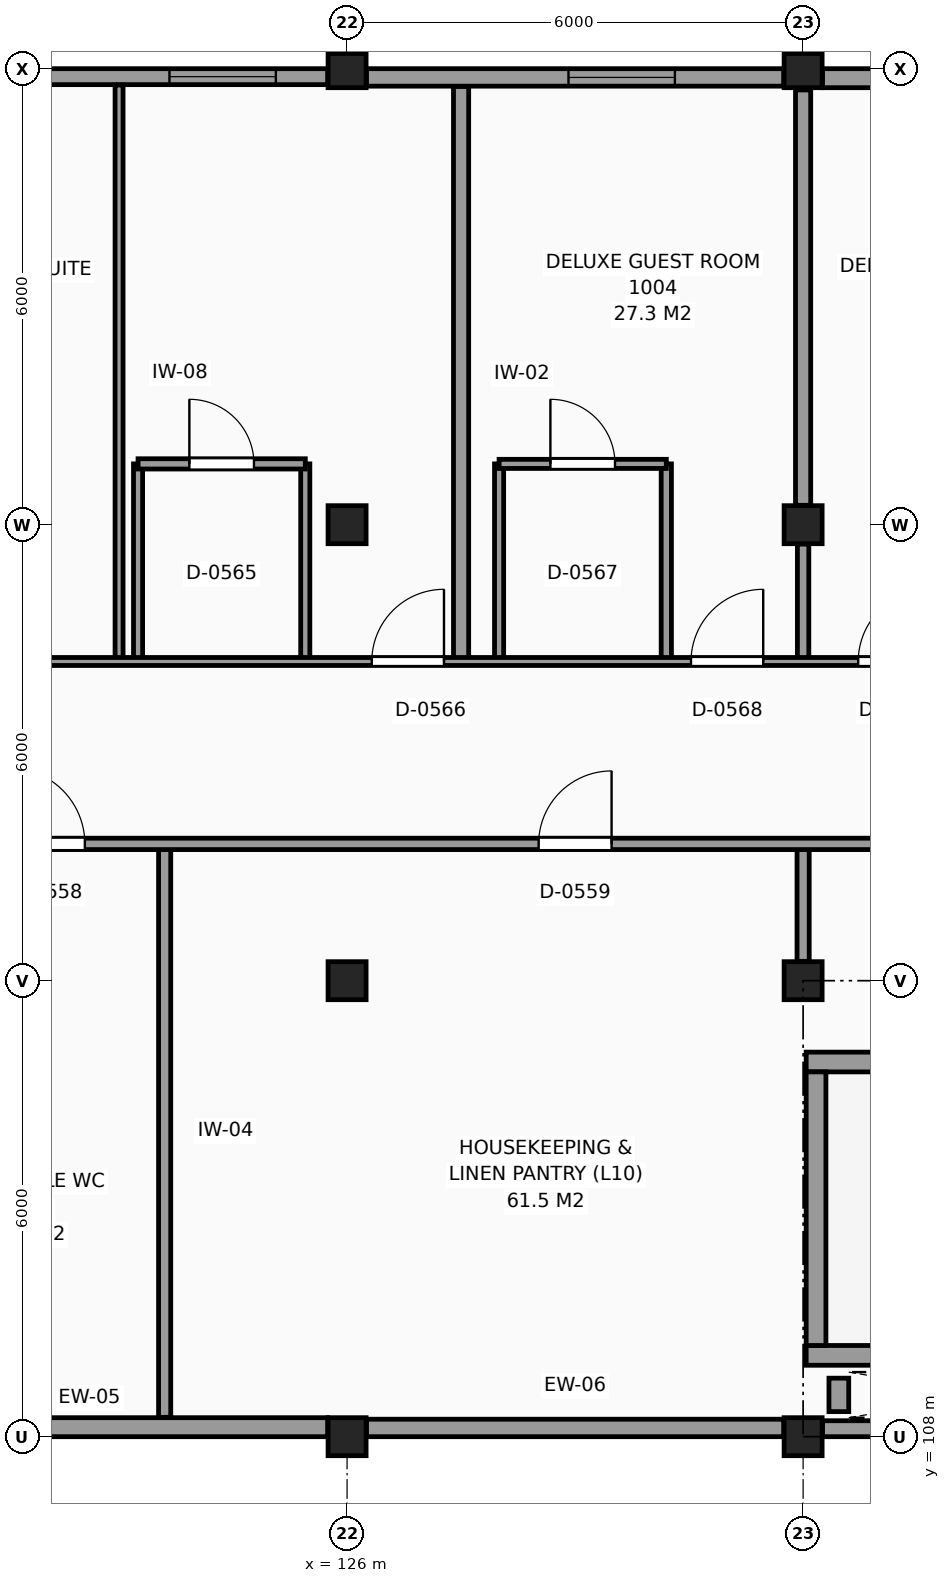
"""IFC4 building model, lengths in metres.
Left out: names, types, materials, properties, quantities, classifications, styles, units other than length and angle.
Written with IfcOpenShell. Run it as: python <this file> out.ifc"""

import sys

from ifc_helpers import new_model, si_unit, direction, frame, frame_2d, origin, origin_2d, place, context, subcontext, project, spatial, rectangle, extrude, element, fill, save


model = new_model("IFC4")
c1 = context("Model", 3, precision=1e-05, world=origin(), true_north=direction((0.0, 1.0)))
c2 = subcontext(c1, "Body", "Model", "MODEL_VIEW")
j1 = project(units=[si_unit("LENGTHUNIT", "METRE"), si_unit("PLANEANGLEUNIT", "RADIAN")], contexts=[c1])
p1 = place(None, origin())
s1 = spatial("IfcSite", under=j1, at=p1, CompositionType="ELEMENT")
p2 = place(p1, origin())
s2 = spatial("IfcBuilding", under=s1, at=p2, CompositionType="ELEMENT")
p3 = place(p2, frame((0.0, 0.0, 41.4)))
s3 = spatial("IfcBuildingStorey", under=s2, at=p3, CompositionType="ELEMENT", Elevation=41.4)
for number, where, z_axis, x_axis in (
    (1, (126.0, 108.0, 0.0), (0.0, 0.0, 1.0), (1.0, 0.0, 0.0)),
    (2, (126.0, 114.0, 0.0), (0.0, 0.0, 1.0), (1.0, 0.0, 0.0)),
    (3, (126.0, 120.0, 0.0), (0.0, 0.0, 1.0), (1.0, 0.0, 0.0)),
    (4, (126.0, 126.0, 0.0), (0.0, 0.0, 1.0), (1.0, 0.0, 0.0)),
    (5, (132.0, 108.0, 0.0), (0.0, 0.0, 1.0), (1.0, 0.0, 0.0)),
    (6, (132.0, 114.0, 0.0), (0.0, 0.0, 1.0), (1.0, 0.0, 0.0)),
    (7, (132.0, 120.0, 0.0), (0.0, 0.0, 1.0), (1.0, 0.0, 0.0)),
    (8, (132.0, 126.0, 0.0), (0.0, 0.0, 1.0), (1.0, 0.0, 0.0)),
):
    element("IfcColumn", number, at=place(p3, frame(where, z_axis=z_axis, x_axis=x_axis)), inside=s3, PredefinedType="COLUMN", context=c2, shape_type="SweptSolid", body=[
        extrude(rectangle(XDim=0.5, YDim=0.5, at=origin_2d()), origin(), (0.0, 0.0, 1.0), 3.3),
    ])
p4 = place(p3, frame((137.745, 125.875, 0.0), z_axis=(0.0, 0.0, 1.0), x_axis=(-1.0, 0.0, 0.0)))
e9 = element("IfcWall", 9, at=p4, inside=s3, PredefinedType="SOLIDWALL", context=c2, shape_type="SweptSolid", body=[
    extrude(rectangle(XDim=5.49, YDim=0.25, at=frame_2d((2.745, 0.0))), origin(), (0.0, 0.0, 1.0), 2.41),
])
p5 = place(p4, frame((2.658, 0.0, 0.8)))
e10 = element("IfcOpeningElement", 10, at=p5, cuts=e9, PredefinedType="OPENING", context=c2, shape_type="SweptSolid", body=[
    extrude(rectangle(XDim=1.4, YDim=1.4, at=frame_2d((0.7, 0.7))), frame((0.0, 0.135, 0.0), z_axis=(0.0, -1.0, 0.0), x_axis=(1.0, 0.0, 0.0)), (0.0, 0.0, 1.0), 0.27),
])
p6 = place(p3, frame((131.745, 125.885, 0.0), z_axis=(0.0, 0.0, 1.0), x_axis=(-1.0, 0.0, 0.0)))
e11 = element("IfcWall", 11, at=p6, inside=s3, PredefinedType="SOLIDWALL", context=c2, shape_type="SweptSolid", body=[
    extrude(rectangle(XDim=5.49, YDim=0.23, at=frame_2d((2.745, 0.0))), origin(), (0.0, 0.0, 1.0), 2.41),
])
p7 = place(p6, frame((1.432, 0.0, 0.8)))
e12 = element("IfcOpeningElement", 12, at=p7, cuts=e11, PredefinedType="OPENING", context=c2, shape_type="SweptSolid", body=[
    extrude(rectangle(XDim=1.4, YDim=1.4, at=frame_2d((0.7, 0.7))), frame((0.0, 0.125, 0.0), z_axis=(0.0, -1.0, 0.0), x_axis=(1.0, 0.0, 0.0)), (0.0, 0.0, 1.0), 0.25),
])
p8 = place(p3, frame((125.745, 125.895, 0.0), z_axis=(0.0, 0.0, 1.0), x_axis=(-1.0, 0.0, 0.0)))
e13 = element("IfcWall", 13, at=p8, inside=s3, PredefinedType="SOLIDWALL", context=c2, shape_type="SweptSolid", body=[
    extrude(rectangle(XDim=5.49, YDim=0.21, at=frame_2d((2.745, 0.0))), origin(), (0.0, 0.0, 1.0), 2.41),
])
p9 = place(p8, frame((0.682, 0.0, 0.8)))
e14 = element("IfcOpeningElement", 14, at=p9, cuts=e13, PredefinedType="OPENING", context=c2, shape_type="SweptSolid", body=[
    extrude(rectangle(XDim=1.4, YDim=1.4, at=frame_2d((0.7, 0.7))), frame((0.0, 0.115, 0.0), z_axis=(0.0, -1.0, 0.0), x_axis=(1.0, 0.0, 0.0)), (0.0, 0.0, 1.0), 0.23),
])
p10 = place(p3, frame((120.255, 108.125, 0.0), z_axis=(0.0, 0.0, 1.0), x_axis=(1.0, 0.0, 0.0)))
e15 = element("IfcWall", 15, at=p10, inside=s3, PredefinedType="SOLIDWALL", context=c2, shape_type="SweptSolid", body=[
    extrude(rectangle(XDim=5.49, YDim=0.25, at=frame_2d((2.745, 0.0))), origin(), (0.0, 0.0, 1.0), 2.41),
])
p11 = place(p3, frame((126.255, 108.115, 0.0), z_axis=(0.0, 0.0, 1.0), x_axis=(1.0, 0.0, 0.0)))
e16 = element("IfcWall", 16, at=p11, inside=s3, PredefinedType="SOLIDWALL", context=c2, shape_type="SweptSolid", body=[
    extrude(rectangle(XDim=5.49, YDim=0.23, at=frame_2d((2.745, 0.0))), origin(), (0.0, 0.0, 1.0), 2.41),
])
p12 = place(p3, frame((132.255, 108.105, 0.0), z_axis=(0.0, 0.0, 1.0), x_axis=(1.0, 0.0, 0.0)))
e17 = element("IfcWall", 17, at=p12, inside=s3, PredefinedType="SOLIDWALL", context=c2, shape_type="SweptSolid", body=[
    extrude(rectangle(XDim=5.49, YDim=0.21, at=frame_2d((2.745, 0.0))), origin(), (0.0, 0.0, 1.0), 3.06),
])
for number, where, z_axis, x_axis in (
    (18, (132.04, 109.07, 0.0), (0.0, 0.0, 1.0), (1.0, 0.0, 0.0)),
    (19, (132.04, 112.93, 0.0), (0.0, 0.0, 1.0), (1.0, 0.0, 0.0)),
):
    element("IfcWall", number, at=place(p3, frame(where, z_axis=z_axis, x_axis=x_axis)), inside=s3, PredefinedType="SHEAR", context=c2, shape_type="SweptSolid", body=[
        extrude(rectangle(XDim=10.72, YDim=0.26, at=frame_2d((5.36, 0.0))), origin(), (0.0, 0.0, 1.0), 3.3),
    ])
p13 = place(p3, frame((132.17, 109.2, 0.0), z_axis=(0.0, 0.0, 1.0), x_axis=(0.0, 1.0, 0.0)))
e20 = element("IfcWall", 20, at=p13, inside=s3, PredefinedType="SHEAR", context=c2, shape_type="SweptSolid", body=[
    extrude(rectangle(XDim=3.6, YDim=0.26, at=frame_2d((1.8, 0.0))), origin(), (0.0, 0.0, 1.0), 3.3),
])
p14 = place(p3, frame((132.47, 108.33, 0.0), z_axis=(0.0, 0.0, 1.0), x_axis=(0.0, 1.0, 0.0)))
e21 = element("IfcWall", 21, at=p14, inside=s3, PredefinedType="SHEAR", context=c2, shape_type="SweptSolid", body=[
    extrude(rectangle(XDim=0.44, YDim=0.26, at=frame_2d((0.22, 0.0))), origin(), (0.0, 0.0, 1.0), 3.3),
])
p15 = place(p3, frame((123.0, 118.2, 0.0), z_axis=(0.0, 0.0, 1.0), x_axis=(0.0, 1.0, 0.0)))
e22 = element("IfcWall", 22, at=p15, inside=s3, PredefinedType="PARTITIONING", context=c2, shape_type="SweptSolid", body=[
    extrude(rectangle(XDim=7.585, YDim=0.105, at=frame_2d((3.792, 0.0))), origin(), (0.0, 0.0, 1.0), 3.06),
])
p16 = place(p3, frame((123.25, 118.2, 0.0), z_axis=(0.0, 0.0, 1.0), x_axis=(0.0, 1.0, 0.0)))
e23 = element("IfcWall", 23, at=p16, inside=s3, PredefinedType="PARTITIONING", context=c2, shape_type="SweptSolid", body=[
    extrude(rectangle(XDim=2.6, YDim=0.12, at=frame_2d((1.3, 0.0))), origin(), (0.0, 0.0, 1.0), 3.06),
])
p17 = place(p3, frame((123.6, 108.255, 0.0), z_axis=(0.0, 0.0, 1.0), x_axis=(0.0, 1.0, 0.0)))
e24 = element("IfcWall", 24, at=p17, inside=s3, PredefinedType="PARTITIONING", context=c2, shape_type="SweptSolid", body=[
    extrude(rectangle(XDim=7.545, YDim=0.16, at=frame_2d((3.772, 0.0))), origin(), (0.0, 0.0, 1.0), 3.06),
])
p18 = place(p3, frame((125.45, 118.2, 0.0), z_axis=(0.0, 0.0, 1.0), x_axis=(0.0, 1.0, 0.0)))
e25 = element("IfcWall", 25, at=p18, inside=s3, PredefinedType="PARTITIONING", context=c2, shape_type="SweptSolid", body=[
    extrude(rectangle(XDim=2.6, YDim=0.12, at=frame_2d((1.3, 0.0))), origin(), (0.0, 0.0, 1.0), 3.06),
])
p19 = place(p3, frame((127.5, 118.2, 0.0), z_axis=(0.0, 0.0, 1.0), x_axis=(0.0, 1.0, 0.0)))
e26 = element("IfcWall", 26, at=p19, inside=s3, PredefinedType="PARTITIONING", context=c2, shape_type="SweptSolid", body=[
    extrude(rectangle(XDim=7.565, YDim=0.2, at=frame_2d((3.782, 0.0))), origin(), (0.0, 0.0, 1.0), 3.06),
])
p20 = place(p3, frame((128.0, 118.2, 0.0), z_axis=(0.0, 0.0, 1.0), x_axis=(0.0, 1.0, 0.0)))
e27 = element("IfcWall", 27, at=p20, inside=s3, PredefinedType="PARTITIONING", context=c2, shape_type="SweptSolid", body=[
    extrude(rectangle(XDim=2.6, YDim=0.12, at=frame_2d((1.3, 0.0))), origin(), (0.0, 0.0, 1.0), 3.06),
])
p21 = place(p3, frame((130.2, 118.2, 0.0), z_axis=(0.0, 0.0, 1.0), x_axis=(0.0, 1.0, 0.0)))
e28 = element("IfcWall", 28, at=p21, inside=s3, PredefinedType="PARTITIONING", context=c2, shape_type="SweptSolid", body=[
    extrude(rectangle(XDim=2.6, YDim=0.135, at=frame_2d((1.3, 0.0))), origin(), (0.0, 0.0, 1.0), 3.06),
])
p22 = place(p3, frame((132.0, 114.255, 0.0), z_axis=(0.0, 0.0, 1.0), x_axis=(0.0, 1.0, 0.0)))
e29 = element("IfcWall", 29, at=p22, inside=s3, PredefinedType="PARTITIONING", context=c2, shape_type="SweptSolid", body=[
    extrude(rectangle(XDim=1.545, YDim=0.16, at=frame_2d((0.772, 0.0))), origin(), (0.0, 0.0, 1.0), 2.26),
])
p23 = place(p3, frame((132.0, 118.2, 0.0), z_axis=(0.0, 0.0, 1.0), x_axis=(0.0, 1.0, 0.0)))
e30 = element("IfcWall", 30, at=p23, inside=s3, PredefinedType="PARTITIONING", context=c2, shape_type="SweptSolid", body=[
    extrude(rectangle(XDim=1.545, YDim=0.15, at=frame_2d((0.772, 0.0))), origin(), (0.0, 0.0, 1.0), 2.26),
])
p24 = place(p3, frame((132.0, 120.255, 0.0), z_axis=(0.0, 0.0, 1.0), x_axis=(0.0, 1.0, 0.0)))
e31 = element("IfcWall", 31, at=p24, inside=s3, PredefinedType="PARTITIONING", context=c2, shape_type="SweptSolid", body=[
    extrude(rectangle(XDim=5.465, YDim=0.2, at=frame_2d((2.732, 0.0))), origin(), (0.0, 0.0, 1.0), 2.26),
])
p25 = place(p3, frame((102.275, 115.8, 0.0), z_axis=(0.0, 0.0, 1.0), x_axis=(1.0, 0.0, 0.0)))
e32 = element("IfcWall", 32, at=p25, inside=s3, PredefinedType="PARTITIONING", context=c2, shape_type="SweptSolid", body=[
    extrude(rectangle(XDim=67.525, YDim=0.15, at=frame_2d((33.763, 0.0))), origin(), (0.0, 0.0, 1.0), 3.06),
])
p26 = place(p25, frame((44.125, 0.0, 0.0)))
e33 = element("IfcOpeningElement", 33, at=p26, cuts=e32, PredefinedType="OPENING", context=c2, shape_type="SweptSolid", body=[
    extrude(rectangle(XDim=1.2, YDim=2.2, at=frame_2d((0.6, 1.1))), frame((0.0, 0.085, 0.0), z_axis=(0.0, -1.0, 0.0), x_axis=(1.0, 0.0, 0.0)), (0.0, 0.0, 1.0), 0.17),
])
p27 = place(p25, frame((14.125, 0.0, 0.0)))
e34 = element("IfcOpeningElement", 34, at=p27, cuts=e32, PredefinedType="OPENING", context=c2, shape_type="SweptSolid", body=[
    extrude(rectangle(XDim=1.2, YDim=2.2, at=frame_2d((0.6, 1.1))), frame((0.0, 0.085, 0.0), z_axis=(0.0, -1.0, 0.0), x_axis=(1.0, 0.0, 0.0)), (0.0, 0.0, 1.0), 0.17),
])
p28 = place(p25, frame((19.275, 0.0, 0.0)))
e35 = element("IfcOpeningElement", 35, at=p28, cuts=e32, PredefinedType="OPENING", context=c2, shape_type="SweptSolid", body=[
    extrude(rectangle(XDim=1.0, YDim=2.15, at=frame_2d((0.5, 1.075))), frame((0.0, 0.085, 0.0), z_axis=(0.0, -1.0, 0.0), x_axis=(1.0, 0.0, 0.0)), (0.0, 0.0, 1.0), 0.17),
])
p29 = place(p25, frame((26.245, 0.0, 0.0)))
e36 = element("IfcOpeningElement", 36, at=p29, cuts=e32, PredefinedType="OPENING", context=c2, shape_type="SweptSolid", body=[
    extrude(rectangle(XDim=0.96, YDim=2.15, at=frame_2d((0.48, 1.075))), frame((0.0, 0.085, 0.0), z_axis=(0.0, -1.0, 0.0), x_axis=(1.0, 0.0, 0.0)), (0.0, 0.0, 1.0), 0.17),
])
p30 = place(p25, frame((48.45, 0.0, 0.0)))
e37 = element("IfcOpeningElement", 37, at=p30, cuts=e32, PredefinedType="OPENING", context=c2, shape_type="SweptSolid", body=[
    extrude(rectangle(XDim=0.95, YDim=2.1, at=frame_2d((0.475, 1.05))), frame((0.0, 0.085, 0.0), z_axis=(0.0, -1.0, 0.0), x_axis=(1.0, 0.0, 0.0)), (0.0, 0.0, 1.0), 0.17),
])
p31 = place(p3, frame((102.275, 118.2, 0.0), z_axis=(0.0, 0.0, 1.0), x_axis=(1.0, 0.0, 0.0)))
e38 = element("IfcWall", 38, at=p31, inside=s3, PredefinedType="PARTITIONING", context=c2, shape_type="SweptSolid", body=[
    extrude(rectangle(XDim=74.225, YDim=0.105, at=frame_2d((37.113, 0.0))), origin(), (0.0, 0.0, 1.0), 3.06),
])
p32 = place(p31, frame((7.55, 0.0, 0.0)))
e39 = element("IfcOpeningElement", 39, at=p32, cuts=e38, PredefinedType="OPENING", context=c2, shape_type="SweptSolid", body=[
    extrude(rectangle(XDim=0.95, YDim=2.1, at=frame_2d((0.475, 1.05))), frame((0.0, 0.062, 0.0), z_axis=(0.0, -1.0, 0.0), x_axis=(1.0, 0.0, 0.0)), (0.0, 0.0, 1.0), 0.125),
])
p33 = place(p31, frame((9.35, 0.0, 0.0)))
e40 = element("IfcOpeningElement", 40, at=p33, cuts=e38, PredefinedType="OPENING", context=c2, shape_type="SweptSolid", body=[
    extrude(rectangle(XDim=0.95, YDim=2.1, at=frame_2d((0.475, 1.05))), frame((0.0, 0.062, 0.0), z_axis=(0.0, -1.0, 0.0), x_axis=(1.0, 0.0, 0.0)), (0.0, 0.0, 1.0), 0.125),
])
p34 = place(p31, frame((24.05, 0.0, 0.0)))
e41 = element("IfcOpeningElement", 41, at=p34, cuts=e38, PredefinedType="OPENING", context=c2, shape_type="SweptSolid", body=[
    extrude(rectangle(XDim=0.95, YDim=2.1, at=frame_2d((0.475, 1.05))), frame((0.0, 0.062, 0.0), z_axis=(0.0, -1.0, 0.0), x_axis=(1.0, 0.0, 0.0)), (0.0, 0.0, 1.0), 0.125),
])
p35 = place(p31, frame((28.25, 0.0, 0.0)))
e42 = element("IfcOpeningElement", 42, at=p35, cuts=e38, PredefinedType="OPENING", context=c2, shape_type="SweptSolid", body=[
    extrude(rectangle(XDim=0.95, YDim=2.1, at=frame_2d((0.475, 1.05))), frame((0.0, 0.062, 0.0), z_axis=(0.0, -1.0, 0.0), x_axis=(1.0, 0.0, 0.0)), (0.0, 0.0, 1.0), 0.125),
])
p36 = place(p31, frame((30.45, 0.0, 0.0)))
e43 = element("IfcOpeningElement", 43, at=p36, cuts=e38, PredefinedType="OPENING", context=c2, shape_type="SweptSolid", body=[
    extrude(rectangle(XDim=0.95, YDim=2.1, at=frame_2d((0.475, 1.05))), frame((0.0, 0.062, 0.0), z_axis=(0.0, -1.0, 0.0), x_axis=(1.0, 0.0, 0.0)), (0.0, 0.0, 1.0), 0.125),
])
p37 = place(p31, frame((36.45, 0.0, 0.0)))
e44 = element("IfcOpeningElement", 44, at=p37, cuts=e38, PredefinedType="OPENING", context=c2, shape_type="SweptSolid", body=[
    extrude(rectangle(XDim=0.95, YDim=2.1, at=frame_2d((0.475, 1.05))), frame((0.0, 0.062, 0.0), z_axis=(0.0, -1.0, 0.0), x_axis=(1.0, 0.0, 0.0)), (0.0, 0.0, 1.0), 0.125),
])
p38 = place(p31, frame((46.25, 0.0, 0.0)))
e45 = element("IfcOpeningElement", 45, at=p38, cuts=e38, PredefinedType="OPENING", context=c2, shape_type="SweptSolid", body=[
    extrude(rectangle(XDim=0.95, YDim=2.1, at=frame_2d((0.475, 1.05))), frame((0.0, 0.062, 0.0), z_axis=(0.0, -1.0, 0.0), x_axis=(1.0, 0.0, 0.0)), (0.0, 0.0, 1.0), 0.125),
])
p39 = place(p31, frame((48.45, 0.0, 0.0)))
e46 = element("IfcOpeningElement", 46, at=p39, cuts=e38, PredefinedType="OPENING", context=c2, shape_type="SweptSolid", body=[
    extrude(rectangle(XDim=0.95, YDim=2.1, at=frame_2d((0.475, 1.05))), frame((0.0, 0.062, 0.0), z_axis=(0.0, -1.0, 0.0), x_axis=(1.0, 0.0, 0.0)), (0.0, 0.0, 1.0), 0.125),
])
p40 = place(p31, frame((62.3, 0.0, 0.0)))
e47 = element("IfcOpeningElement", 47, at=p40, cuts=e38, PredefinedType="OPENING", context=c2, shape_type="SweptSolid", body=[
    extrude(rectangle(XDim=0.95, YDim=2.1, at=frame_2d((0.475, 1.05))), frame((0.0, 0.062, 0.0), z_axis=(0.0, -1.0, 0.0), x_axis=(1.0, 0.0, 0.0)), (0.0, 0.0, 1.0), 0.125),
])
p41 = place(p31, frame((64.85, 0.0, 0.0)))
e48 = element("IfcOpeningElement", 48, at=p41, cuts=e38, PredefinedType="OPENING", context=c2, shape_type="SweptSolid", body=[
    extrude(rectangle(XDim=0.95, YDim=2.1, at=frame_2d((0.475, 1.05))), frame((0.0, 0.062, 0.0), z_axis=(0.0, -1.0, 0.0), x_axis=(1.0, 0.0, 0.0)), (0.0, 0.0, 1.0), 0.125),
])
p42 = place(p31, frame((68.95, 0.0, 0.0)))
e49 = element("IfcOpeningElement", 49, at=p42, cuts=e38, PredefinedType="OPENING", context=c2, shape_type="SweptSolid", body=[
    extrude(rectangle(XDim=0.95, YDim=2.1, at=frame_2d((0.475, 1.05))), frame((0.0, 0.062, 0.0), z_axis=(0.0, -1.0, 0.0), x_axis=(1.0, 0.0, 0.0)), (0.0, 0.0, 1.0), 0.125),
])
p43 = place(p3, frame((123.25, 120.8, 0.0), z_axis=(0.0, 0.0, 1.0), x_axis=(1.0, 0.0, 0.0)))
e50 = element("IfcWall", 50, at=p43, inside=s3, PredefinedType="PARTITIONING", context=c2, shape_type="SweptSolid", body=[
    extrude(rectangle(XDim=2.2, YDim=0.135, at=frame_2d((1.1, 0.0))), origin(), (0.0, 0.0, 1.0), 3.06),
])
p44 = place(p43, frame((0.675, 0.0, 0.0)))
e51 = element("IfcOpeningElement", 51, at=p44, cuts=e50, PredefinedType="OPENING", context=c2, shape_type="SweptSolid", body=[
    extrude(rectangle(XDim=0.85, YDim=2.1, at=frame_2d((0.425, 1.05))), frame((0.0, 0.078, 0.0), z_axis=(0.0, -1.0, 0.0), x_axis=(1.0, 0.0, 0.0)), (0.0, 0.0, 1.0), 0.155),
])
p45 = place(p3, frame((128.0, 120.8, 0.0), z_axis=(0.0, 0.0, 1.0), x_axis=(1.0, 0.0, 0.0)))
e52 = element("IfcWall", 52, at=p45, inside=s3, PredefinedType="PARTITIONING", context=c2, shape_type="SweptSolid", body=[
    extrude(rectangle(XDim=2.2, YDim=0.12, at=frame_2d((1.1, 0.0))), origin(), (0.0, 0.0, 1.0), 3.06),
])
p46 = place(p45, frame((0.675, 0.0, 0.0)))
e53 = element("IfcOpeningElement", 53, at=p46, cuts=e52, PredefinedType="OPENING", context=c2, shape_type="SweptSolid", body=[
    extrude(rectangle(XDim=0.85, YDim=2.1, at=frame_2d((0.425, 1.05))), frame((0.0, 0.07, 0.0), z_axis=(0.0, -1.0, 0.0), x_axis=(1.0, 0.0, 0.0)), (0.0, 0.0, 1.0), 0.14),
])
p47 = place(p9, origin())
e54 = element("IfcWindow", 54, at=p47, inside=s3, PartitioningType="SINGLE_PANEL", PredefinedType="WINDOW", context=c2, shape_type="SweptSolid", body=[
    extrude(rectangle(XDim=1.4, YDim=1.4, at=frame_2d((0.7, 0.7))), frame((0.0, 0.03, 0.0), z_axis=(0.0, -1.0, 0.0), x_axis=(1.0, 0.0, 0.0)), (0.0, 0.0, 1.0), 0.06),
])
fill(e14, e54)
p48 = place(p7, origin())
e55 = element("IfcWindow", 55, at=p48, inside=s3, PartitioningType="SINGLE_PANEL", PredefinedType="WINDOW", context=c2, shape_type="SweptSolid", body=[
    extrude(rectangle(XDim=1.4, YDim=1.4, at=frame_2d((0.7, 0.7))), frame((0.0, 0.03, 0.0), z_axis=(0.0, -1.0, 0.0), x_axis=(1.0, 0.0, 0.0)), (0.0, 0.0, 1.0), 0.06),
])
fill(e12, e55)
p49 = place(p28, origin())
e56 = element("IfcDoor", 56, at=p49, inside=s3, OperationType="SINGLE_SWING_LEFT", PredefinedType="DOOR", context=c2, shape_type="SweptSolid", body=[
    extrude(rectangle(XDim=1.0, YDim=2.15, at=frame_2d((0.5, 1.075))), frame((0.0, 0.025, 0.0), z_axis=(0.0, -1.0, 0.0), x_axis=(1.0, 0.0, 0.0)), (0.0, 0.0, 1.0), 0.05),
])
fill(e35, e56)
p50 = place(p29, origin())
e57 = element("IfcDoor", 57, at=p50, inside=s3, OperationType="SINGLE_SWING_RIGHT", PredefinedType="DOOR", context=c2, shape_type="SweptSolid", body=[
    extrude(rectangle(XDim=0.96, YDim=2.15, at=frame_2d((0.48, 1.075))), frame((0.0, 0.025, 0.0), z_axis=(0.0, -1.0, 0.0), x_axis=(1.0, 0.0, 0.0)), (0.0, 0.0, 1.0), 0.05),
])
fill(e36, e57)
p51 = place(p44, origin())
e58 = element("IfcDoor", 58, at=p51, inside=s3, OperationType="SINGLE_SWING_LEFT", PredefinedType="DOOR", context=c2, shape_type="SweptSolid", body=[
    extrude(rectangle(XDim=0.85, YDim=2.1, at=frame_2d((0.425, 1.05))), frame((0.0, 0.025, 0.0), z_axis=(0.0, -1.0, 0.0), x_axis=(1.0, 0.0, 0.0)), (0.0, 0.0, 1.0), 0.05),
])
fill(e51, e58)
p52 = place(p34, origin())
e59 = element("IfcDoor", 59, at=p52, inside=s3, OperationType="SINGLE_SWING_RIGHT", PredefinedType="DOOR", context=c2, shape_type="SweptSolid", body=[
    extrude(rectangle(XDim=0.95, YDim=2.1, at=frame_2d((0.475, 1.05))), frame((0.0, 0.025, 0.0), z_axis=(0.0, -1.0, 0.0), x_axis=(1.0, 0.0, 0.0)), (0.0, 0.0, 1.0), 0.05),
])
fill(e41, e59)
p53 = place(p46, origin())
e60 = element("IfcDoor", 60, at=p53, inside=s3, OperationType="SINGLE_SWING_LEFT", PredefinedType="DOOR", context=c2, shape_type="SweptSolid", body=[
    extrude(rectangle(XDim=0.85, YDim=2.1, at=frame_2d((0.425, 1.05))), frame((0.0, 0.025, 0.0), z_axis=(0.0, -1.0, 0.0), x_axis=(1.0, 0.0, 0.0)), (0.0, 0.0, 1.0), 0.05),
])
fill(e53, e60)
p54 = place(p35, origin())
e61 = element("IfcDoor", 61, at=p54, inside=s3, OperationType="SINGLE_SWING_RIGHT", PredefinedType="DOOR", context=c2, shape_type="SweptSolid", body=[
    extrude(rectangle(XDim=0.95, YDim=2.1, at=frame_2d((0.475, 1.05))), frame((0.0, 0.025, 0.0), z_axis=(0.0, -1.0, 0.0), x_axis=(1.0, 0.0, 0.0)), (0.0, 0.0, 1.0), 0.05),
])
fill(e42, e61)
p55 = place(p36, origin())
e62 = element("IfcDoor", 62, at=p55, inside=s3, OperationType="SINGLE_SWING_RIGHT", PredefinedType="DOOR", context=c2, shape_type="SweptSolid", body=[
    extrude(rectangle(XDim=0.95, YDim=2.1, at=frame_2d((0.475, 1.05))), frame((0.0, 0.025, 0.0), z_axis=(0.0, -1.0, 0.0), x_axis=(1.0, 0.0, 0.0)), (0.0, 0.0, 1.0), 0.05),
])
fill(e43, e62)
save(model, sys.argv[1])
